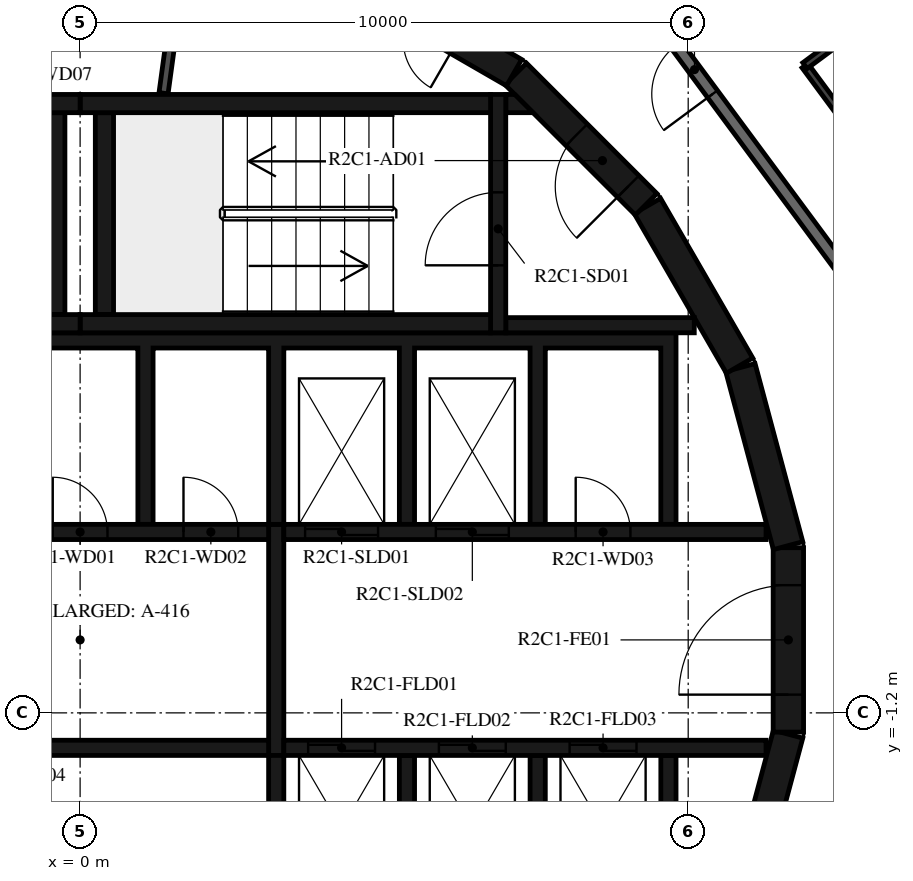
"""IFC4 building model, lengths in metres.
Left out: names, types, materials, properties, quantities, classifications, styles, units other than length and angle.
Written with IfcOpenShell. Run it as: python <this file> out.ifc"""

import sys

from ifc_helpers import new_model, si_unit, direction, frame, frame_2d, origin, place, context, subcontext, project, spatial, polyline, rectangle, outline, extrude, element, fill, save


model = new_model("IFC4")
c1 = context("Model", 3, precision=1e-05, world=origin(), true_north=direction((0.0, 1.0)))
c2 = subcontext(c1, "Body", "Model", "MODEL_VIEW")
j1 = project(units=[si_unit("LENGTHUNIT", "METRE"), si_unit("PLANEANGLEUNIT", "RADIAN")], contexts=[c1])
p1 = place(None, origin())
s1 = spatial("IfcSite", under=j1, at=p1, CompositionType="ELEMENT")
p2 = place(p1, origin())
s2 = spatial("IfcBuilding", under=s1, at=p2, CompositionType="ELEMENT")
p3 = place(p2, frame((0.0, 0.0, 101.2)))
s3 = spatial("IfcBuildingStorey", under=s2, at=p3, CompositionType="ELEMENT", Elevation=101.2)
p4 = place(p3, frame((10.858, -4.479, 0.0), z_axis=(0.0, 0.0, 1.0), x_axis=(0.258734743916, 0.965948410781, 0.0)))
e1 = element("IfcWall", 1, at=p4, inside=s3, PredefinedType="SHEAR", context=c2, shape_type="SweptSolid", body=[
    extrude(rectangle(XDim=3.033, YDim=0.5, at=frame_2d((1.516, 0.0))), origin(), (0.0, 0.0, 1.0), 3.12),
])
p5 = place(p3, frame((11.647, -1.516, 0.0), z_axis=(0.0, 0.0, 1.0), x_axis=(0.0, 1.0, 0.0)))
e2 = element("IfcWall", 2, at=p5, inside=s3, PredefinedType="SHEAR", context=c2, shape_type="SweptSolid", body=[
    extrude(rectangle(XDim=3.033, YDim=0.5, at=frame_2d((1.516, 0.0))), origin(), (0.0, 0.0, 1.0), 3.12),
])
p6 = place(p5, frame((0.616, 0.0, 0.0)))
e3 = element("IfcOpeningElement", 3, at=p6, cuts=e2, PredefinedType="OPENING", context=c2, shape_type="SweptSolid", body=[
    extrude(rectangle(XDim=1.8, YDim=2.1, at=frame_2d((0.9, 1.05))), frame((0.0, 0.26, 0.0), z_axis=(0.0, -1.0, 0.0), x_axis=(1.0, 0.0, 0.0)), (0.0, 0.0, 1.0), 0.52),
])
for number, where, z_axis, x_axis in (
    (4, (11.643, 1.55, 0.0), (0.0, 0.0, 1.0), (-0.259, 0.966, 0.0)),
    (5, (10.845, 4.51, 0.0), (0.0, 0.0, 1.0), (-0.5, 0.866, 0.0)),
):
    element("IfcWall", number, at=place(p3, frame(where, z_axis=z_axis, x_axis=x_axis)), inside=s3, PredefinedType="SHEAR", context=c2, shape_type="SweptSolid", body=[
        extrude(rectangle(XDim=3.033, YDim=0.5, at=frame_2d((1.516, 0.0))), origin(), (0.0, 0.0, 1.0), 3.12),
    ])
p7 = place(p3, frame((9.308, 7.164, 0.0), z_axis=(0.0, 0.0, 1.0), x_axis=(-0.707106781187, 0.707106781187, 0.0)))
e6 = element("IfcWall", 6, at=p7, inside=s3, PredefinedType="SHEAR", context=c2, shape_type="SweptSolid", body=[
    extrude(rectangle(XDim=3.032, YDim=0.5, at=frame_2d((1.516, 0.0))), origin(), (0.0, 0.0, 1.0), 3.12),
])
p8 = place(p7, frame((0.416, 0.0, 0.0)))
e7 = element("IfcOpeningElement", 7, at=p8, cuts=e6, PredefinedType="OPENING", context=c2, shape_type="SweptSolid", body=[
    extrude(rectangle(XDim=1.2, YDim=2.1, at=frame_2d((0.6, 1.05))), frame((0.0, 0.26, 0.0), z_axis=(0.0, -1.0, 0.0), x_axis=(1.0, 0.0, 0.0)), (0.0, 0.0, 1.0), 0.52),
])
p9 = place(p3, frame((7.137, 9.329, 0.0), z_axis=(0.0, 0.0, 1.0), x_axis=(-0.865975092491, 0.500087131594, 0.0)))
e8 = element("IfcWall", 8, at=p9, inside=s3, PredefinedType="SHEAR", context=c2, shape_type="SweptSolid", body=[
    extrude(rectangle(XDim=3.033, YDim=0.5, at=frame_2d((1.516, 0.0))), origin(), (0.0, 0.0, 1.0), 3.12),
])
p10 = place(p9, frame((1.066, 0.0, 0.0)))
e9 = element("IfcOpeningElement", 9, at=p10, cuts=e8, PredefinedType="OPENING", context=c2, shape_type="SweptSolid", body=[
    extrude(rectangle(XDim=0.9, YDim=2.1, at=frame_2d((0.45, 1.05))), frame((0.0, 0.26, 0.0), z_axis=(0.0, -1.0, 0.0), x_axis=(1.0, 0.0, 0.0)), (0.0, 0.0, 1.0), 0.52),
])
for number, where, z_axis, x_axis in (
    (10, (0.0, 5.2, 0.0), (0.0, 0.0, 1.0), (1.0, 0.0, 0.0)),
    (11, (0.0, 8.82, 0.0), (0.0, 0.0, 1.0), (1.0, 0.0, 0.0)),
):
    element("IfcWall", number, at=place(p3, frame(where, z_axis=z_axis, x_axis=x_axis)), inside=s3, PredefinedType="SHEAR", context=c2, shape_type="SweptSolid", body=[
        extrude(rectangle(XDim=6.75, YDim=0.3, at=frame_2d((3.375, 0.0))), origin(), (0.0, 0.0, 1.0), 3.12),
    ])
p11 = place(p3, frame((0.4, 5.35, 0.0), z_axis=(0.0, 0.0, 1.0), x_axis=(0.0, 1.0, 0.0)))
e12 = element("IfcWall", 12, at=p11, inside=s3, PredefinedType="SHEAR", context=c2, shape_type="SweptSolid", body=[
    extrude(rectangle(XDim=3.32, YDim=0.3, at=frame_2d((1.66, 0.0))), origin(), (0.0, 0.0, 1.0), 3.12),
])
p12 = place(p3, frame((6.875, 5.05, 0.0), z_axis=(0.0, 0.0, 1.0), x_axis=(0.0, 1.0, 0.0)))
e13 = element("IfcWall", 13, at=p12, inside=s3, PredefinedType="SHEAR", context=c2, shape_type="SweptSolid", body=[
    extrude(rectangle(XDim=3.92, YDim=0.25, at=frame_2d((1.96, 0.0))), origin(), (0.0, 0.0, 1.0), 3.12),
])
p13 = place(p12, frame((1.11, 0.0, 0.0)))
e14 = element("IfcOpeningElement", 14, at=p13, cuts=e13, PredefinedType="OPENING", context=c2, shape_type="SweptSolid", body=[
    extrude(rectangle(XDim=1.2, YDim=2.1, at=frame_2d((0.6, 1.05))), frame((0.0, 0.135, 0.0), z_axis=(0.0, -1.0, 0.0), x_axis=(1.0, 0.0, 0.0)), (0.0, 0.0, 1.0), 0.27),
])
p14 = place(p3, frame((7.0, 5.175, 0.0), z_axis=(0.0, 0.0, 1.0), x_axis=(1.0, 0.0, 0.0)))
e15 = element("IfcWall", 15, at=p14, inside=s3, PredefinedType="SHEAR", context=c2, shape_type="SweptSolid", body=[
    extrude(rectangle(XDim=3.1, YDim=0.25, at=frame_2d((1.55, 0.0))), origin(), (0.0, 0.0, 1.0), 3.12),
])
p15 = place(p3, origin())
e16 = element("IfcWall", 16, at=p15, inside=s3, PredefinedType="SHEAR", context=c2, shape_type="SweptSolid", body=[
    extrude(outline(polyline([(7.448, 8.67), (7.0, 8.67), (7.0, 8.97), (7.148, 8.97), (7.448, 8.67)])), origin(), (0.0, 0.0, 1.0), 3.12),
])
for number, where, z_axis, x_axis in (
    (17, (-6.75, 5.2, 0.0), (0.0, 0.0, 1.0), (1.0, 0.0, 0.0)),
    (18, (-6.75, 8.82, 0.0), (0.0, 0.0, 1.0), (1.0, 0.0, 0.0)),
):
    element("IfcWall", number, at=place(p3, frame(where, z_axis=z_axis, x_axis=x_axis)), inside=s3, PredefinedType="SHEAR", context=c2, shape_type="SweptSolid", body=[
        extrude(rectangle(XDim=6.75, YDim=0.3, at=frame_2d((3.375, 0.0))), origin(), (0.0, 0.0, 1.0), 3.12),
    ])
p16 = place(p3, frame((-0.4, 5.35, 0.0), z_axis=(0.0, 0.0, 1.0), x_axis=(0.0, 1.0, 0.0)))
e19 = element("IfcWall", 19, at=p16, inside=s3, PredefinedType="SHEAR", context=c2, shape_type="SweptSolid", body=[
    extrude(rectangle(XDim=3.32, YDim=0.3, at=frame_2d((1.66, 0.0))), origin(), (0.0, 0.0, 1.0), 3.12),
])
p17 = place(p3, origin())
e20 = element("IfcWall", 20, at=p17, inside=s3, PredefinedType="SHEAR", context=c2, shape_type="SweptSolid", body=[
    extrude(outline(polyline([(-9.55, 4.8), (-7.65, 4.8), (-7.65, 1.9), (-7.4, 1.9), (-7.4, 4.8), (-5.5, 4.8), (-5.5, 1.9), (-5.25, 1.9), (-5.25, 4.8), (-3.35, 4.8), (-3.35, 1.9), (-3.1, 1.9), (-3.1, 4.8), (-1.2, 4.8), (-1.2, 1.9), (-0.95, 1.9), (-0.95, 4.8), (0.95, 4.8), (0.95, 1.9), (1.2, 1.9), (1.2, 4.8), (3.1, 4.8), (3.1, 1.9), (3.35, 1.9), (3.35, 4.8), (5.25, 4.8), (5.25, 1.9), (5.5, 1.9), (5.5, 4.8), (7.4, 4.8), (7.4, 1.9), (7.65, 1.9), (7.65, 4.8), (9.55, 4.8), (9.55, 1.9), (9.8, 1.9), (9.8, 4.8), (9.8, 5.05), (-9.8, 5.05), (-9.8, 4.8), (-9.8, 1.9), (-9.55, 1.9), (-9.55, 4.8)])), origin(), (0.0, 0.0, 1.0), 3.12),
])
p18 = place(p3, origin())
e21 = element("IfcWall", 21, at=p18, inside=s3, PredefinedType="SHEAR", context=c2, shape_type="SweptSolid", body=[
    extrude(outline(polyline([(9.8, -5.05), (9.8, -4.8), (9.8, -1.9), (9.55, -1.9), (9.55, -4.8), (7.65, -4.8), (7.65, -1.9), (7.4, -1.9), (7.4, -4.8), (5.5, -4.8), (5.5, -1.9), (5.25, -1.9), (5.25, -4.8), (3.35, -4.8), (3.35, -1.9), (3.1, -1.9), (3.1, -4.8), (-5.25, -4.8), (-5.25, -1.9), (-5.5, -1.9), (-5.5, -4.8), (-7.4, -4.8), (-7.4, -1.9), (-7.65, -1.9), (-7.65, -4.8), (-9.55, -4.8), (-9.55, -1.9), (-9.8, -1.9), (-9.8, -4.8), (-9.8, -5.05), (9.8, -5.05)])), origin(), (0.0, 0.0, 1.0), 3.12),
])
p19 = place(p3, frame((-11.28, 1.775, 0.0), z_axis=(0.0, 0.0, 1.0), x_axis=(1.0, 0.0, 0.0)))
e22 = element("IfcWall", 22, at=p19, inside=s3, PredefinedType="SHEAR", context=c2, shape_type="SweptSolid", body=[
    extrude(rectangle(XDim=14.38, YDim=0.25, at=frame_2d((7.19, 0.0))), origin(), (0.0, 0.0, 1.0), 3.12),
])
p20 = place(p19, frame((2.13, 0.0, 0.0)))
e23 = element("IfcOpeningElement", 23, at=p20, cuts=e22, PredefinedType="OPENING", context=c2, shape_type="SweptSolid", body=[
    extrude(rectangle(XDim=1.1, YDim=2.1, at=frame_2d((0.55, 1.05))), frame((0.0, 0.135, 0.0), z_axis=(0.0, -1.0, 0.0), x_axis=(1.0, 0.0, 0.0)), (0.0, 0.0, 1.0), 0.27),
])
p21 = place(p19, frame((4.28, 0.0, 0.0)))
e24 = element("IfcOpeningElement", 24, at=p21, cuts=e22, PredefinedType="OPENING", context=c2, shape_type="SweptSolid", body=[
    extrude(rectangle(XDim=1.1, YDim=2.1, at=frame_2d((0.55, 1.05))), frame((0.0, 0.135, 0.0), z_axis=(0.0, -1.0, 0.0), x_axis=(1.0, 0.0, 0.0)), (0.0, 0.0, 1.0), 0.27),
])
p22 = place(p19, frame((6.43, 0.0, 0.0)))
e25 = element("IfcOpeningElement", 25, at=p22, cuts=e22, PredefinedType="OPENING", context=c2, shape_type="SweptSolid", body=[
    extrude(rectangle(XDim=1.1, YDim=2.1, at=frame_2d((0.55, 1.05))), frame((0.0, 0.135, 0.0), z_axis=(0.0, -1.0, 0.0), x_axis=(1.0, 0.0, 0.0)), (0.0, 0.0, 1.0), 0.27),
])
p23 = place(p19, frame((8.58, 0.0, 0.0)))
e26 = element("IfcOpeningElement", 26, at=p23, cuts=e22, PredefinedType="OPENING", context=c2, shape_type="SweptSolid", body=[
    extrude(rectangle(XDim=1.1, YDim=2.1, at=frame_2d((0.55, 1.05))), frame((0.0, 0.135, 0.0), z_axis=(0.0, -1.0, 0.0), x_axis=(1.0, 0.0, 0.0)), (0.0, 0.0, 1.0), 0.27),
])
p24 = place(p19, frame((10.83, 0.0, 0.0)))
e27 = element("IfcOpeningElement", 27, at=p24, cuts=e22, PredefinedType="OPENING", context=c2, shape_type="SweptSolid", body=[
    extrude(rectangle(XDim=0.9, YDim=2.1, at=frame_2d((0.45, 1.05))), frame((0.0, 0.135, 0.0), z_axis=(0.0, -1.0, 0.0), x_axis=(1.0, 0.0, 0.0)), (0.0, 0.0, 1.0), 0.27),
])
p25 = place(p19, frame((12.98, 0.0, 0.0)))
e28 = element("IfcOpeningElement", 28, at=p25, cuts=e22, PredefinedType="OPENING", context=c2, shape_type="SweptSolid", body=[
    extrude(rectangle(XDim=0.9, YDim=2.1, at=frame_2d((0.45, 1.05))), frame((0.0, 0.135, 0.0), z_axis=(0.0, -1.0, 0.0), x_axis=(1.0, 0.0, 0.0)), (0.0, 0.0, 1.0), 0.27),
])
p26 = place(p3, frame((3.35, 1.775, 0.0), z_axis=(0.0, 0.0, 1.0), x_axis=(1.0, 0.0, 0.0)))
e29 = element("IfcWall", 29, at=p26, inside=s3, PredefinedType="SHEAR", context=c2, shape_type="SweptSolid", body=[
    extrude(rectangle(XDim=7.93, YDim=0.25, at=frame_2d((3.965, 0.0))), origin(), (0.0, 0.0, 1.0), 3.12),
])
p27 = place(p26, frame((0.35, 0.0, 0.0)))
e30 = element("IfcOpeningElement", 30, at=p27, cuts=e29, PredefinedType="OPENING", context=c2, shape_type="SweptSolid", body=[
    extrude(rectangle(XDim=1.2, YDim=2.4, at=frame_2d((0.6, 1.2))), frame((0.0, 0.135, 0.0), z_axis=(0.0, -1.0, 0.0), x_axis=(1.0, 0.0, 0.0)), (0.0, 0.0, 1.0), 0.27),
])
p28 = place(p26, frame((2.5, 0.0, 0.0)))
e31 = element("IfcOpeningElement", 31, at=p28, cuts=e29, PredefinedType="OPENING", context=c2, shape_type="SweptSolid", body=[
    extrude(rectangle(XDim=1.2, YDim=2.4, at=frame_2d((0.6, 1.2))), frame((0.0, 0.135, 0.0), z_axis=(0.0, -1.0, 0.0), x_axis=(1.0, 0.0, 0.0)), (0.0, 0.0, 1.0), 0.27),
])
p29 = place(p26, frame((4.8, 0.0, 0.0)))
e32 = element("IfcOpeningElement", 32, at=p29, cuts=e29, PredefinedType="OPENING", context=c2, shape_type="SweptSolid", body=[
    extrude(rectangle(XDim=0.9, YDim=2.1, at=frame_2d((0.45, 1.05))), frame((0.0, 0.135, 0.0), z_axis=(0.0, -1.0, 0.0), x_axis=(1.0, 0.0, 0.0)), (0.0, 0.0, 1.0), 0.27),
])
p30 = place(p3, frame((-11.28, -1.775, 0.0), z_axis=(0.0, 0.0, 1.0), x_axis=(1.0, 0.0, 0.0)))
e33 = element("IfcWall", 33, at=p30, inside=s3, PredefinedType="SHEAR", context=c2, shape_type="SweptSolid", body=[
    extrude(rectangle(XDim=14.38, YDim=0.25, at=frame_2d((7.19, 0.0))), origin(), (0.0, 0.0, 1.0), 3.12),
])
p31 = place(p30, frame((9.755, 0.0, 0.0)))
e34 = element("IfcOpeningElement", 34, at=p31, cuts=e33, PredefinedType="OPENING", context=c2, shape_type="SweptSolid", body=[
    extrude(rectangle(XDim=0.9, YDim=2.1, at=frame_2d((0.45, 1.05))), frame((0.0, 0.135, 0.0), z_axis=(0.0, -1.0, 0.0), x_axis=(1.0, 0.0, 0.0)), (0.0, 0.0, 1.0), 0.27),
])
p32 = place(p3, frame((3.35, -1.775, 0.0), z_axis=(0.0, 0.0, 1.0), x_axis=(1.0, 0.0, 0.0)))
e35 = element("IfcWall", 35, at=p32, inside=s3, PredefinedType="SHEAR", context=c2, shape_type="SweptSolid", body=[
    extrude(rectangle(XDim=7.93, YDim=0.25, at=frame_2d((3.965, 0.0))), origin(), (0.0, 0.0, 1.0), 3.12),
])
p33 = place(p32, frame((0.4, 0.0, 0.0)))
e36 = element("IfcOpeningElement", 36, at=p33, cuts=e35, PredefinedType="OPENING", context=c2, shape_type="SweptSolid", body=[
    extrude(rectangle(XDim=1.1, YDim=2.4, at=frame_2d((0.55, 1.2))), frame((0.0, 0.135, 0.0), z_axis=(0.0, -1.0, 0.0), x_axis=(1.0, 0.0, 0.0)), (0.0, 0.0, 1.0), 0.27),
])
p34 = place(p32, frame((2.55, 0.0, 0.0)))
e37 = element("IfcOpeningElement", 37, at=p34, cuts=e35, PredefinedType="OPENING", context=c2, shape_type="SweptSolid", body=[
    extrude(rectangle(XDim=1.1, YDim=2.4, at=frame_2d((0.55, 1.2))), frame((0.0, 0.135, 0.0), z_axis=(0.0, -1.0, 0.0), x_axis=(1.0, 0.0, 0.0)), (0.0, 0.0, 1.0), 0.27),
])
p35 = place(p32, frame((4.7, 0.0, 0.0)))
e38 = element("IfcOpeningElement", 38, at=p35, cuts=e35, PredefinedType="OPENING", context=c2, shape_type="SweptSolid", body=[
    extrude(rectangle(XDim=1.1, YDim=2.4, at=frame_2d((0.55, 1.2))), frame((0.0, 0.135, 0.0), z_axis=(0.0, -1.0, 0.0), x_axis=(1.0, 0.0, 0.0)), (0.0, 0.0, 1.0), 0.27),
])
p36 = place(p3, frame((3.225, -1.9, 0.0), z_axis=(0.0, 0.0, 1.0), x_axis=(0.0, 1.0, 0.0)))
e39 = element("IfcWall", 39, at=p36, inside=s3, PredefinedType="SHEAR", context=c2, shape_type="SweptSolid", body=[
    extrude(rectangle(XDim=3.8, YDim=0.25, at=frame_2d((1.9, 0.0))), origin(), (0.0, 0.0, 1.0), 3.12),
])
p37 = place(p3, frame((1.691, 11.326, 0.0), z_axis=(0.0, 0.0, 1.0), x_axis=(-0.135344253201, -0.990798633994, 0.0)))
e40 = element("IfcWall", 40, at=p37, inside=s3, PredefinedType="PARTITIONING", context=c2, shape_type="SweptSolid", body=[
    extrude(rectangle(XDim=2.358, YDim=0.15, at=frame_2d((1.179, 0.0))), origin(), (0.0, 0.0, 1.0), 3.12),
])
p38 = place(p37, frame((0.729, 0.0, 0.0)))
e41 = element("IfcOpeningElement", 41, at=p38, cuts=e40, PredefinedType="OPENING", context=c2, shape_type="SweptSolid", body=[
    extrude(rectangle(XDim=0.9, YDim=2.1, at=frame_2d((0.45, 1.05))), frame((0.0, 0.085, 0.0), z_axis=(0.0, -1.0, 0.0), x_axis=(1.0, 0.0, 0.0)), (0.0, 0.0, 1.0), 0.17),
])
p39 = place(p3, frame((11.1, -8.829, 0.0), z_axis=(0.0, 0.0, 1.0), x_axis=(0.398741918631, 0.917063183388, 0.0)))
e42 = element("IfcWall", 42, at=p39, inside=s3, PredefinedType="STANDARD", context=c2, shape_type="SweptSolid", body=[
    extrude(rectangle(XDim=7.342, YDim=0.2, at=frame_2d((3.671, 0.0))), origin(), (0.0, 0.0, 1.0), 3.12),
])
p40 = place(p3, frame((13.196, 5.198, 0.0), z_axis=(0.0, 0.0, 1.0), x_axis=(-0.594805187394, 0.803869883159, 0.0)))
e43 = element("IfcWall", 43, at=p40, inside=s3, PredefinedType="STANDARD", context=c2, shape_type="SweptSolid", body=[
    extrude(rectangle(XDim=7.342, YDim=0.2, at=frame_2d((3.671, 0.0))), origin(), (0.0, 0.0, 1.0), 3.12),
])
p41 = place(p40, frame((4.7, 0.0, 0.0)))
e44 = element("IfcOpeningElement", 44, at=p41, cuts=e43, PredefinedType="OPENING", context=c2, shape_type="SweptSolid", body=[
    extrude(rectangle(XDim=1.0, YDim=2.1, at=frame_2d((0.5, 1.05))), frame((0.0, 0.11, 0.0), z_axis=(0.0, -1.0, 0.0), x_axis=(1.0, 0.0, 0.0)), (0.0, 0.0, 1.0), 0.22),
])
p42 = place(p3, frame((14.641, 5.767, 0.0), z_axis=(0.0, 0.0, 1.0), x_axis=(-0.594785744505, 0.803884269117, 0.0)))
e45 = element("IfcWall", 45, at=p42, inside=s3, PredefinedType="PARTITIONING", context=c2, shape_type="SweptSolid", body=[
    extrude(rectangle(XDim=4.573, YDim=0.12, at=frame_2d((2.287, 0.0))), origin(), (0.0, 0.0, 1.0), 3.12),
])
p43 = place(p42, frame((0.513, 0.0, 0.0)))
e46 = element("IfcOpeningElement", 46, at=p43, cuts=e45, PredefinedType="OPENING", context=c2, shape_type="SweptSolid", body=[
    extrude(rectangle(XDim=0.9, YDim=2.1, at=frame_2d((0.45, 1.05))), frame((0.0, 0.07, 0.0), z_axis=(0.0, -1.0, 0.0), x_axis=(1.0, 0.0, 0.0)), (0.0, 0.0, 1.0), 0.14),
])
p44 = place(p3, frame((11.921, 9.444, 0.0), z_axis=(0.0, 0.0, 1.0), x_axis=(0.803768532163, 0.594942137274, 0.0)))
e47 = element("IfcWall", 47, at=p44, inside=s3, PredefinedType="PARTITIONING", context=c2, shape_type="SweptSolid", body=[
    extrude(rectangle(XDim=1.146, YDim=0.12, at=frame_2d((0.573, 0.0))), origin(), (0.0, 0.0, 1.0), 3.12),
])
p45 = place(p13, origin())
e48 = element("IfcDoor", 48, at=p45, inside=s3, OperationType="SINGLE_SWING_LEFT", PredefinedType="DOOR", context=c2, shape_type="SweptSolid", body=[
    extrude(rectangle(XDim=1.2, YDim=2.1, at=frame_2d((0.6, 1.05))), frame((0.0, 0.025, 0.0), z_axis=(0.0, -1.0, 0.0), x_axis=(1.0, 0.0, 0.0)), (0.0, 0.0, 1.0), 0.05),
])
fill(e14, e48)
p46 = place(p8, origin())
e49 = element("IfcDoor", 49, at=p46, inside=s3, OperationType="SINGLE_SWING_RIGHT", PredefinedType="DOOR", context=c2, shape_type="SweptSolid", body=[
    extrude(rectangle(XDim=1.2, YDim=2.1, at=frame_2d((0.6, 1.05))), frame((0.0, 0.025, 0.0), z_axis=(0.0, -1.0, 0.0), x_axis=(1.0, 0.0, 0.0)), (0.0, 0.0, 1.0), 0.05),
])
fill(e7, e49)
p47 = place(p6, origin())
e50 = element("IfcDoor", 50, at=p47, inside=s3, OperationType="DOUBLE_DOOR_SINGLE_SWING", PredefinedType="DOOR", context=c2, shape_type="SweptSolid", body=[
    extrude(rectangle(XDim=1.8, YDim=2.1, at=frame_2d((0.9, 1.05))), frame((0.0, 0.025, 0.0), z_axis=(0.0, -1.0, 0.0), x_axis=(1.0, 0.0, 0.0)), (0.0, 0.0, 1.0), 0.05),
])
fill(e3, e50)
p48 = place(p27, origin())
e51 = element("IfcDoor", 51, at=p48, inside=s3, OperationType="DOUBLE_DOOR_SLIDING", PredefinedType="DOOR", context=c2, shape_type="SweptSolid", body=[
    extrude(rectangle(XDim=1.2, YDim=2.4, at=frame_2d((0.6, 1.2))), frame((0.0, 0.025, 0.0), z_axis=(0.0, -1.0, 0.0), x_axis=(1.0, 0.0, 0.0)), (0.0, 0.0, 1.0), 0.05),
])
fill(e30, e51)
p49 = place(p28, origin())
e52 = element("IfcDoor", 52, at=p49, inside=s3, OperationType="DOUBLE_DOOR_SLIDING", PredefinedType="DOOR", context=c2, shape_type="SweptSolid", body=[
    extrude(rectangle(XDim=1.2, YDim=2.4, at=frame_2d((0.6, 1.2))), frame((0.0, 0.025, 0.0), z_axis=(0.0, -1.0, 0.0), x_axis=(1.0, 0.0, 0.0)), (0.0, 0.0, 1.0), 0.05),
])
fill(e31, e52)
p50 = place(p33, origin())
e53 = element("IfcDoor", 53, at=p50, inside=s3, OperationType="DOUBLE_DOOR_SLIDING", PredefinedType="DOOR", context=c2, shape_type="SweptSolid", body=[
    extrude(rectangle(XDim=1.1, YDim=2.4, at=frame_2d((0.55, 1.2))), frame((0.0, 0.025, 0.0), z_axis=(0.0, -1.0, 0.0), x_axis=(1.0, 0.0, 0.0)), (0.0, 0.0, 1.0), 0.05),
])
fill(e36, e53)
p51 = place(p34, origin())
e54 = element("IfcDoor", 54, at=p51, inside=s3, OperationType="DOUBLE_DOOR_SLIDING", PredefinedType="DOOR", context=c2, shape_type="SweptSolid", body=[
    extrude(rectangle(XDim=1.1, YDim=2.4, at=frame_2d((0.55, 1.2))), frame((0.0, 0.025, 0.0), z_axis=(0.0, -1.0, 0.0), x_axis=(1.0, 0.0, 0.0)), (0.0, 0.0, 1.0), 0.05),
])
fill(e37, e54)
p52 = place(p35, origin())
e55 = element("IfcDoor", 55, at=p52, inside=s3, OperationType="DOUBLE_DOOR_SLIDING", PredefinedType="DOOR", context=c2, shape_type="SweptSolid", body=[
    extrude(rectangle(XDim=1.1, YDim=2.4, at=frame_2d((0.55, 1.2))), frame((0.0, 0.025, 0.0), z_axis=(0.0, -1.0, 0.0), x_axis=(1.0, 0.0, 0.0)), (0.0, 0.0, 1.0), 0.05),
])
fill(e38, e55)
p53 = place(p24, origin())
e56 = element("IfcDoor", 56, at=p53, inside=s3, OperationType="SINGLE_SWING_RIGHT", PredefinedType="DOOR", context=c2, shape_type="SweptSolid", body=[
    extrude(rectangle(XDim=0.9, YDim=2.1, at=frame_2d((0.45, 1.05))), frame((0.0, 0.025, 0.0), z_axis=(0.0, -1.0, 0.0), x_axis=(1.0, 0.0, 0.0)), (0.0, 0.0, 1.0), 0.05),
])
fill(e27, e56)
p54 = place(p25, origin())
e57 = element("IfcDoor", 57, at=p54, inside=s3, OperationType="SINGLE_SWING_LEFT", PredefinedType="DOOR", context=c2, shape_type="SweptSolid", body=[
    extrude(rectangle(XDim=0.9, YDim=2.1, at=frame_2d((0.45, 1.05))), frame((0.0, 0.025, 0.0), z_axis=(0.0, -1.0, 0.0), x_axis=(1.0, 0.0, 0.0)), (0.0, 0.0, 1.0), 0.05),
])
fill(e28, e57)
p55 = place(p29, origin())
e58 = element("IfcDoor", 58, at=p55, inside=s3, OperationType="SINGLE_SWING_RIGHT", PredefinedType="DOOR", context=c2, shape_type="SweptSolid", body=[
    extrude(rectangle(XDim=0.9, YDim=2.1, at=frame_2d((0.45, 1.05))), frame((0.0, 0.025, 0.0), z_axis=(0.0, -1.0, 0.0), x_axis=(1.0, 0.0, 0.0)), (0.0, 0.0, 1.0), 0.05),
])
fill(e32, e58)
p56 = place(p41, origin())
e59 = element("IfcDoor", 59, at=p56, inside=s3, OperationType="SINGLE_SWING_RIGHT", PredefinedType="DOOR", context=c2, shape_type="SweptSolid", body=[
    extrude(rectangle(XDim=1.0, YDim=2.1, at=frame_2d((0.5, 1.05))), frame((0.0, 0.025, 0.0), z_axis=(0.0, -1.0, 0.0), x_axis=(1.0, 0.0, 0.0)), (0.0, 0.0, 1.0), 0.05),
])
fill(e44, e59)
save(model, sys.argv[1])
